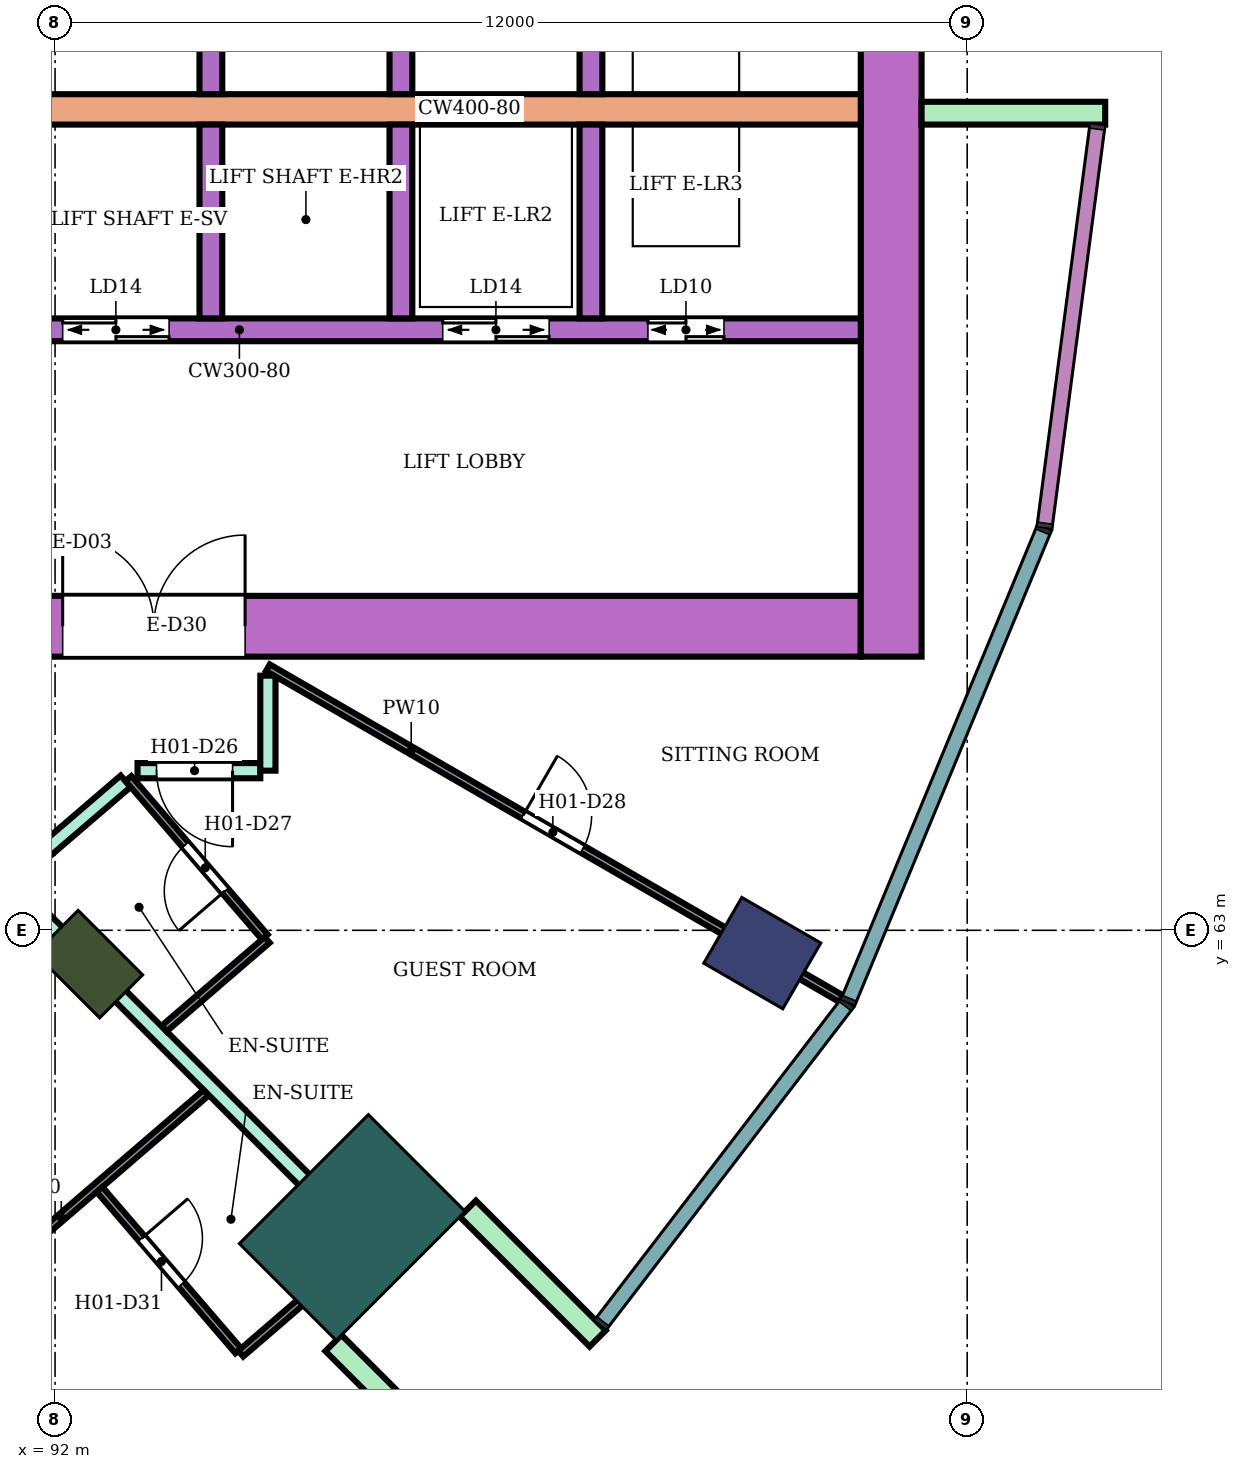
"""IFC4 building model, lengths in metres.
Left out: names, types, materials, properties, quantities, classifications, styles, units other than length and angle.
Written with IfcOpenShell. Run it as: python <this file> out.ifc"""

import sys

from ifc_helpers import new_model, si_unit, direction, frame, frame_2d, origin, origin_2d, place, context, subcontext, project, spatial, rectangle, extrude, element, fill, save


model = new_model("IFC4")
c1 = context("Model", 3, precision=1e-05, world=origin(), true_north=direction((0.0, 1.0)))
c2 = subcontext(c1, "Body", "Model", "MODEL_VIEW")
j1 = project(units=[si_unit("LENGTHUNIT", "METRE"), si_unit("PLANEANGLEUNIT", "RADIAN")], contexts=[c1])
p1 = place(None, origin())
s1 = spatial("IfcSite", under=j1, at=p1, CompositionType="ELEMENT")
p2 = place(p1, origin())
s2 = spatial("IfcBuilding", under=s1, at=p2, CompositionType="ELEMENT")
p3 = place(p2, frame((0.0, 0.0, 32.6)))
s3 = spatial("IfcBuildingStorey", under=s2, at=p3, CompositionType="ELEMENT", Elevation=32.6)
p4 = place(p3, frame((101.304, 62.7, 0.0), z_axis=(0.0, 0.0, 1.0), x_axis=(0.866025403784, -0.5, 0.0)))
e1 = element("IfcColumn", 1, at=p4, inside=s3, PredefinedType="COLUMN", context=c2, shape_type="SweptSolid", body=[
    extrude(rectangle(XDim=1.2, YDim=1.0, at=origin_2d()), origin(), (0.0, 0.0, 1.0), 3.8),
])
p5 = place(p3, frame((92.445, 62.555, 0.0), z_axis=(0.0, 0.0, 1.0), x_axis=(0.707106781187, -0.707106781187, 0.0)))
e2 = element("IfcColumn", 2, at=p5, inside=s3, PredefinedType="COLUMN", context=c2, shape_type="SweptSolid", body=[
    extrude(rectangle(XDim=1.2, YDim=0.8, at=origin_2d()), origin(), (0.0, 0.0, 1.0), 3.8),
])
p6 = place(p3, frame((95.91, 59.09, 0.0), z_axis=(0.0, 0.0, 1.0), x_axis=(0.707106781187, -0.707106781187, 0.0)))
e3 = element("IfcColumn", 3, at=p6, inside=s3, PredefinedType="COLUMN", context=c2, shape_type="SweptSolid", body=[
    extrude(rectangle(XDim=1.8, YDim=2.4, at=origin_2d()), origin(), (0.0, 0.0, 1.0), 3.8),
])
p7 = place(p3, frame((87.9, 67.0, 0.0), z_axis=(0.0, 0.0, 1.0), x_axis=(1.0, 0.0, 0.0)))
e4 = element("IfcWall", 4, at=p7, inside=s3, PredefinedType="SHEAR", context=c2, shape_type="SweptSolid", body=[
    extrude(rectangle(XDim=14.7, YDim=0.8, at=frame_2d((7.35, 0.0))), origin(), (0.0, 0.0, 1.0), 3.48),
])
p8 = place(p7, frame((4.2, 0.0, 0.0)))
e5 = element("IfcOpeningElement", 5, at=p8, cuts=e4, PredefinedType="OPENING", context=c2, shape_type="SweptSolid", body=[
    extrude(rectangle(XDim=2.4, YDim=2.4, at=frame_2d((1.2, 1.2))), frame((0.0, 0.41, 0.0), z_axis=(0.0, -1.0, 0.0), x_axis=(1.0, 0.0, 0.0)), (0.0, 0.0, 1.0), 0.82),
])
p9 = place(p3, frame((103.0, 66.6, 0.0), z_axis=(0.0, 0.0, 1.0), x_axis=(0.0, 1.0, 0.0)))
e6 = element("IfcWall", 6, at=p9, inside=s3, PredefinedType="SHEAR", context=c2, shape_type="SweptSolid", body=[
    extrude(rectangle(XDim=16.8, YDim=0.8, at=frame_2d((8.4, 0.0))), origin(), (0.0, 0.0, 1.0), 3.48),
])
p10 = place(p3, frame((91.7, 73.8, 0.0), z_axis=(0.0, 0.0, 1.0), x_axis=(1.0, 0.0, 0.0)))
e7 = element("IfcWall", 7, at=p10, inside=s3, PredefinedType="SHEAR", context=c2, shape_type="SweptSolid", body=[
    extrude(rectangle(XDim=10.9, YDim=0.4, at=frame_2d((5.45, 0.0))), origin(), (0.0, 0.0, 1.0), 3.48),
])
p11 = place(p3, frame((91.7, 70.9, 0.0), z_axis=(0.0, 0.0, 1.0), x_axis=(1.0, 0.0, 0.0)))
e8 = element("IfcWall", 8, at=p11, inside=s3, PredefinedType="SHEAR", context=c2, shape_type="SweptSolid", body=[
    extrude(rectangle(XDim=10.9, YDim=0.3, at=frame_2d((5.45, 0.0))), origin(), (0.0, 0.0, 1.0), 3.48),
])
p12 = place(p11, frame((0.4, 0.0, 0.0)))
e9 = element("IfcOpeningElement", 9, at=p12, cuts=e8, PredefinedType="OPENING", context=c2, shape_type="SweptSolid", body=[
    extrude(rectangle(XDim=1.4, YDim=2.1, at=frame_2d((0.7, 1.05))), frame((0.0, 0.16, 0.0), z_axis=(0.0, -1.0, 0.0), x_axis=(1.0, 0.0, 0.0)), (0.0, 0.0, 1.0), 0.32),
])
p13 = place(p11, frame((5.4, 0.0, 0.0)))
e10 = element("IfcOpeningElement", 10, at=p13, cuts=e8, PredefinedType="OPENING", context=c2, shape_type="SweptSolid", body=[
    extrude(rectangle(XDim=1.4, YDim=2.1, at=frame_2d((0.7, 1.05))), frame((0.0, 0.16, 0.0), z_axis=(0.0, -1.0, 0.0), x_axis=(1.0, 0.0, 0.0)), (0.0, 0.0, 1.0), 0.32),
])
p14 = place(p11, frame((8.1, 0.0, 0.0)))
e11 = element("IfcOpeningElement", 11, at=p14, cuts=e8, PredefinedType="OPENING", context=c2, shape_type="SweptSolid", body=[
    extrude(rectangle(XDim=1.0, YDim=2.1, at=frame_2d((0.5, 1.05))), frame((0.0, 0.16, 0.0), z_axis=(0.0, -1.0, 0.0), x_axis=(1.0, 0.0, 0.0)), (0.0, 0.0, 1.0), 0.32),
])
for number, where, z_axis, x_axis in (
    (12, (94.05, 74.0, 0.0), (0.0, 0.0, 1.0), (0.0, 1.0, 0.0)),
    (13, (96.55, 74.0, 0.0), (0.0, 0.0, 1.0), (0.0, 1.0, 0.0)),
    (14, (99.05, 74.0, 0.0), (0.0, 0.0, 1.0), (0.0, 1.0, 0.0)),
    (15, (94.05, 71.05, 0.0), (0.0, 0.0, 1.0), (0.0, 1.0, 0.0)),
    (16, (96.55, 71.05, 0.0), (0.0, 0.0, 1.0), (0.0, 1.0, 0.0)),
    (17, (99.05, 71.05, 0.0), (0.0, 0.0, 1.0), (0.0, 1.0, 0.0)),
):
    element("IfcWall", number, at=place(p3, frame(where, z_axis=z_axis, x_axis=x_axis)), inside=s3, PredefinedType="SHEAR", context=c2, shape_type="SweptSolid", body=[
        extrude(rectangle(XDim=2.55, YDim=0.3, at=frame_2d((1.275, 0.0))), origin(), (0.0, 0.0, 1.0), 3.48),
    ])
for number, where, z_axis, x_axis in (
    (18, (103.4, 73.75, 0.0), (0.0, 0.0, 1.0), (1.0, 0.0, 0.0)),
    (19, (95.662, 57.57, 0.0), (0.0, 0.0, 1.0), (0.707, -0.707, 0.0)),
    (20, (97.43, 59.338, 0.0), (0.0, 0.0, 1.0), (0.707, -0.707, 0.0)),
):
    element("IfcWall", number, at=place(p3, frame(where, z_axis=z_axis, x_axis=x_axis)), inside=s3, PredefinedType="NOTDEFINED", context=c2, shape_type="SweptSolid", body=[
        extrude(rectangle(XDim=2.416, YDim=0.3, at=frame_2d((1.208, 0.0))), origin(), (0.0, 0.0, 1.0), 3.8),
    ])
p15 = place(p3, frame((88.235, 60.931, 0.0), z_axis=(0.0, 0.0, 1.0), x_axis=(0.758799498714, 0.651324282329, 0.0)))
e21 = element("IfcWall", 21, at=p15, inside=s3, PredefinedType="PARTITIONING", context=c2, shape_type="SweptSolid", body=[
    extrude(rectangle(XDim=6.186, YDim=0.2, at=frame_2d((3.093, 0.0))), origin(), (0.0, 0.0, 1.0), 3.35),
])
p16 = place(p15, frame((1.519, 0.0, 0.0)))
e22 = element("IfcOpeningElement", 22, at=p16, cuts=e21, PredefinedType="OPENING", context=c2, shape_type="SweptSolid", body=[
    extrude(rectangle(XDim=1.0, YDim=2.1, at=frame_2d((0.5, 1.05))), frame((0.0, 0.11, 0.0), z_axis=(0.0, -1.0, 0.0), x_axis=(1.0, 0.0, 0.0)), (0.0, 0.0, 1.0), 0.22),
])
p17 = place(p3, frame((88.16, 60.863, 0.0), z_axis=(0.0, 0.0, 1.0), x_axis=(0.499946996988, -0.866056002925, 0.0)))
e23 = element("IfcWall", 23, at=p17, inside=s3, PredefinedType="PARTITIONING", context=c2, shape_type="SweptSolid", body=[
    extrude(rectangle(XDim=9.475, YDim=0.2, at=frame_2d((4.737, 0.0))), origin(), (0.0, 0.0, 1.0), 3.35),
])
p18 = place(p3, frame((91.449, 63.548, 0.0), z_axis=(0.0, 0.0, 1.0), x_axis=(0.706984804638, -0.707228736698, 0.0)))
e24 = element("IfcWall", 24, at=p18, inside=s3, PredefinedType="PARTITIONING", context=c2, shape_type="SweptSolid", body=[
    extrude(rectangle(XDim=7.006, YDim=0.2, at=frame_2d((3.503, 0.0))), origin(), (0.0, 0.0, 1.0), 3.35),
])
p19 = place(p3, frame((93.085, 65.1, 0.0), z_axis=(0.0, 0.0, 1.0), x_axis=(1.0, 0.0, 0.0)))
e25 = element("IfcWall", 25, at=p19, inside=s3, PredefinedType="PARTITIONING", context=c2, shape_type="SweptSolid", body=[
    extrude(rectangle(XDim=1.615, YDim=0.2, at=frame_2d((0.808, 0.0))), origin(), (0.0, 0.0, 1.0), 3.35),
])
p20 = place(p19, frame((0.25, 0.0, 0.0)))
e26 = element("IfcOpeningElement", 26, at=p20, cuts=e25, PredefinedType="OPENING", context=c2, shape_type="SweptSolid", body=[
    extrude(rectangle(XDim=1.0, YDim=2.1, at=frame_2d((0.5, 1.05))), frame((0.0, 0.11, 0.0), z_axis=(0.0, -1.0, 0.0), x_axis=(1.0, 0.0, 0.0)), (0.0, 0.0, 1.0), 0.22),
])
p21 = place(p3, frame((94.8, 65.1, 0.0), z_axis=(0.0, 0.0, 1.0), x_axis=(0.0, 1.0, 0.0)))
e27 = element("IfcWall", 27, at=p21, inside=s3, PredefinedType="PARTITIONING", context=c2, shape_type="SweptSolid", body=[
    extrude(rectangle(XDim=1.25, YDim=0.2, at=frame_2d((0.625, 0.0))), origin(), (0.0, 0.0, 1.0), 3.35),
])
p22 = place(p3, frame((90.178, 57.587, 0.0), z_axis=(0.0, 0.0, 1.0), x_axis=(0.758140003227, 0.652091815243, 0.0)))
e28 = element("IfcWall", 28, at=p22, inside=s3, PredefinedType="PARTITIONING", context=c2, shape_type="SweptSolid", body=[
    extrude(rectangle(XDim=5.021, YDim=0.1, at=frame_2d((2.51, 0.0))), origin(), (0.0, 0.0, 1.0), 3.35),
])
p23 = place(p22, frame((1.071, 0.0, 0.0)))
e29 = element("IfcOpeningElement", 29, at=p23, cuts=e28, PredefinedType="OPENING", context=c2, shape_type="SweptSolid", body=[
    extrude(rectangle(XDim=0.9, YDim=2.1, at=frame_2d((0.45, 1.05))), frame((0.0, 0.06, 0.0), z_axis=(0.0, -1.0, 0.0), x_axis=(1.0, 0.0, 0.0)), (0.0, 0.0, 1.0), 0.12),
])
p24 = place(p3, frame((92.585, 59.591, 0.0), z_axis=(0.0, 0.0, 1.0), x_axis=(0.652011200591, -0.758209334092, 0.0)))
e30 = element("IfcWall", 30, at=p24, inside=s3, PredefinedType="PARTITIONING", context=c2, shape_type="SweptSolid", body=[
    extrude(rectangle(XDim=2.8, YDim=0.1, at=frame_2d((1.4, 0.0))), origin(), (0.0, 0.0, 1.0), 3.35),
])
p25 = place(p24, frame((0.85, 0.0, 0.0)))
e31 = element("IfcOpeningElement", 31, at=p25, cuts=e30, PredefinedType="OPENING", context=c2, shape_type="SweptSolid", body=[
    extrude(rectangle(XDim=0.8, YDim=2.1, at=frame_2d((0.4, 1.05))), frame((0.0, 0.06, 0.0), z_axis=(0.0, -1.0, 0.0), x_axis=(1.0, 0.0, 0.0)), (0.0, 0.0, 1.0), 0.12),
])
p26 = place(p3, frame((92.965, 64.997, 0.0), z_axis=(0.0, 0.0, 1.0), x_axis=(0.652069888227, -0.758158862553, 0.0)))
e32 = element("IfcWall", 32, at=p26, inside=s3, PredefinedType="PARTITIONING", context=c2, shape_type="SweptSolid", body=[
    extrude(rectangle(XDim=2.75, YDim=0.1, at=frame_2d((1.375, 0.0))), origin(), (0.0, 0.0, 1.0), 3.35),
])
p27 = place(p26, frame((1.15, 0.0, 0.0)))
e33 = element("IfcOpeningElement", 33, at=p27, cuts=e32, PredefinedType="OPENING", context=c2, shape_type="SweptSolid", body=[
    extrude(rectangle(XDim=0.8, YDim=2.1, at=frame_2d((0.4, 1.05))), frame((0.0, 0.06, 0.0), z_axis=(0.0, -1.0, 0.0), x_axis=(1.0, 0.0, 0.0)), (0.0, 0.0, 1.0), 0.12),
])
p28 = place(p3, frame((93.435, 61.707, 0.0), z_axis=(0.0, 0.0, 1.0), x_axis=(0.758070495124, 0.652172618578, 0.0)))
e34 = element("IfcWall", 34, at=p28, inside=s3, PredefinedType="PARTITIONING", context=c2, shape_type="SweptSolid", body=[
    extrude(rectangle(XDim=1.789, YDim=0.1, at=frame_2d((0.895, 0.0))), origin(), (0.0, 0.0, 1.0), 3.35),
])
p29 = place(p3, frame((94.443, 57.43, 0.0), z_axis=(0.0, 0.0, 1.0), x_axis=(0.757840386328, 0.65243999636, 0.0)))
e35 = element("IfcWall", 35, at=p29, inside=s3, PredefinedType="PARTITIONING", context=c2, shape_type="SweptSolid", body=[
    extrude(rectangle(XDim=2.108, YDim=0.1, at=frame_2d((1.054, 0.0))), origin(), (0.0, 0.0, 1.0), 3.35),
])
p30 = place(p3, frame((94.8, 66.455, 0.0), z_axis=(0.0, 0.0, 1.0), x_axis=(0.86602264145, -0.500004784474, 0.0)))
e36 = element("IfcWall", 36, at=p30, inside=s3, PredefinedType="PARTITIONING", context=c2, shape_type="SweptSolid", body=[
    extrude(rectangle(XDim=8.708, YDim=0.1, at=frame_2d((4.354, 0.0))), origin(), (0.0, 0.0, 1.0), 3.35),
])
p31 = place(p30, frame((3.879, 0.0, 0.0)))
e37 = element("IfcOpeningElement", 37, at=p31, cuts=e36, PredefinedType="OPENING", context=c2, shape_type="SweptSolid", body=[
    extrude(rectangle(XDim=0.9, YDim=2.1, at=frame_2d((0.45, 1.05))), frame((0.0, 0.06, 0.0), z_axis=(0.0, -1.0, 0.0), x_axis=(1.0, 0.0, 0.0)), (0.0, 0.0, 1.0), 0.12),
])
p32 = place(p20, frame((1.0, 0.0, 0.0), z_axis=(0.0, 0.0, 1.0), x_axis=(-1.0, 0.0, 0.0)))
e38 = element("IfcDoor", 38, at=p32, inside=s3, OperationType="SINGLE_SWING_LEFT", PredefinedType="DOOR", context=c2, shape_type="SweptSolid", body=[
    extrude(rectangle(XDim=1.0, YDim=2.1, at=frame_2d((0.5, 1.05))), frame((0.0, 0.025, 0.0), z_axis=(0.0, -1.0, 0.0), x_axis=(1.0, 0.0, 0.0)), (0.0, 0.0, 1.0), 0.05),
])
fill(e26, e38)
p33 = place(p27, frame((0.8, 0.0, 0.0), z_axis=(0.0, 0.0, 1.0), x_axis=(-1.0, 0.0, 0.0)))
e39 = element("IfcDoor", 39, at=p33, inside=s3, OperationType="SINGLE_SWING_LEFT", PredefinedType="DOOR", context=c2, shape_type="SweptSolid", body=[
    extrude(rectangle(XDim=0.8, YDim=2.1, at=frame_2d((0.4, 1.05))), frame((0.0, 0.025, 0.0), z_axis=(0.0, -1.0, 0.0), x_axis=(1.0, 0.0, 0.0)), (0.0, 0.0, 1.0), 0.05),
])
fill(e33, e39)
p34 = place(p31, origin())
e40 = element("IfcDoor", 40, at=p34, inside=s3, OperationType="SINGLE_SWING_LEFT", PredefinedType="DOOR", context=c2, shape_type="SweptSolid", body=[
    extrude(rectangle(XDim=0.9, YDim=2.1, at=frame_2d((0.45, 1.05))), frame((0.0, 0.025, 0.0), z_axis=(0.0, -1.0, 0.0), x_axis=(1.0, 0.0, 0.0)), (0.0, 0.0, 1.0), 0.05),
])
fill(e37, e40)
p35 = place(p25, origin())
e41 = element("IfcDoor", 41, at=p35, inside=s3, OperationType="SINGLE_SWING_LEFT", PredefinedType="DOOR", context=c2, shape_type="SweptSolid", body=[
    extrude(rectangle(XDim=0.8, YDim=2.1, at=frame_2d((0.4, 1.05))), frame((0.0, 0.025, 0.0), z_axis=(0.0, -1.0, 0.0), x_axis=(1.0, 0.0, 0.0)), (0.0, 0.0, 1.0), 0.05),
])
fill(e31, e41)
p36 = place(p12, origin())
e42 = element("IfcDoor", 42, at=p36, inside=s3, OperationType="DOUBLE_DOOR_SLIDING", PredefinedType="DOOR", context=c2, shape_type="SweptSolid", body=[
    extrude(rectangle(XDim=1.4, YDim=2.1, at=frame_2d((0.7, 1.05))), frame((0.0, 0.025, 0.0), z_axis=(0.0, -1.0, 0.0), x_axis=(1.0, 0.0, 0.0)), (0.0, 0.0, 1.0), 0.05),
])
fill(e9, e42)
p37 = place(p13, origin())
e43 = element("IfcDoor", 43, at=p37, inside=s3, OperationType="DOUBLE_DOOR_SLIDING", PredefinedType="DOOR", context=c2, shape_type="SweptSolid", body=[
    extrude(rectangle(XDim=1.4, YDim=2.1, at=frame_2d((0.7, 1.05))), frame((0.0, 0.025, 0.0), z_axis=(0.0, -1.0, 0.0), x_axis=(1.0, 0.0, 0.0)), (0.0, 0.0, 1.0), 0.05),
])
fill(e10, e43)
p38 = place(p14, origin())
e44 = element("IfcDoor", 44, at=p38, inside=s3, OperationType="DOUBLE_DOOR_SLIDING", PredefinedType="DOOR", context=c2, shape_type="SweptSolid", body=[
    extrude(rectangle(XDim=1.0, YDim=2.1, at=frame_2d((0.5, 1.05))), frame((0.0, 0.025, 0.0), z_axis=(0.0, -1.0, 0.0), x_axis=(1.0, 0.0, 0.0)), (0.0, 0.0, 1.0), 0.05),
])
fill(e11, e44)
p39 = place(p8, origin())
e45 = element("IfcDoor", 45, at=p39, inside=s3, OperationType="DOUBLE_DOOR_SINGLE_SWING", PredefinedType="DOOR", context=c2, shape_type="SweptSolid", body=[
    extrude(rectangle(XDim=2.4, YDim=2.4, at=frame_2d((1.2, 1.2))), frame((0.0, 0.025, 0.0), z_axis=(0.0, -1.0, 0.0), x_axis=(1.0, 0.0, 0.0)), (0.0, 0.0, 1.0), 0.05),
])
fill(e5, e45)
save(model, sys.argv[1])
